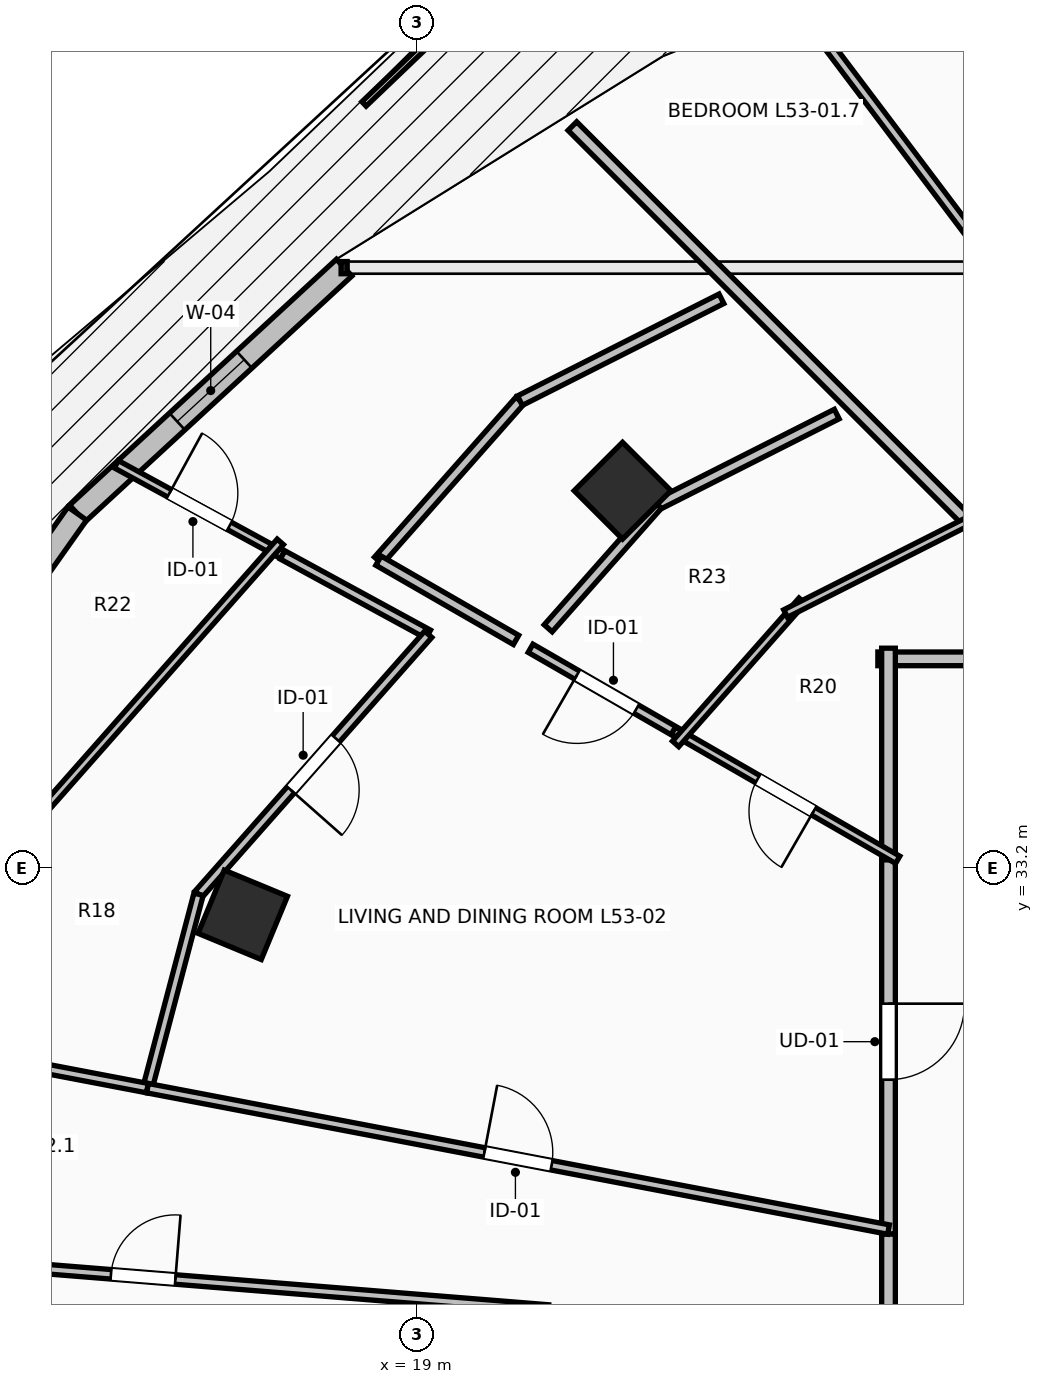
"""IFC4 building model, lengths in metres.
Left out: names, types, materials, properties, quantities, classifications, styles, units other than length and angle.
Written with IfcOpenShell. Run it as: python <this file> out.ifc"""

import sys

from ifc_helpers import new_model, si_unit, direction, frame, frame_2d, origin, origin_2d, place, context, subcontext, project, spatial, rectangle, extrude, element, fill, save


model = new_model("IFC4")
c1 = context("Model", 3, precision=1e-05, world=origin(), true_north=direction((0.0, 1.0)))
c2 = subcontext(c1, "Body", "Model", "MODEL_VIEW")
j1 = project(units=[si_unit("LENGTHUNIT", "METRE"), si_unit("PLANEANGLEUNIT", "RADIAN")], contexts=[c1])
p1 = place(None, origin())
s1 = spatial("IfcSite", under=j1, at=p1, CompositionType="ELEMENT")
p2 = place(p1, origin())
s2 = spatial("IfcBuilding", under=s1, at=p2, CompositionType="ELEMENT")
p3 = place(p2, frame((0.0, 0.0, 196.6)))
s3 = spatial("IfcBuildingStorey", under=s2, at=p3, CompositionType="ELEMENT", Elevation=196.6)
for number, where, z_axis, x_axis in (
    (1, (21.701, 38.162, 0.0), (0.0, 0.0, 1.0), (-0.707, 0.707, 0.0)),
    (2, (16.705, 32.582, 0.0), (0.0, 0.0, 1.0), (-0.924, 0.383, 0.0)),
):
    element("IfcColumn", number, at=place(p3, frame(where, z_axis=z_axis, x_axis=x_axis)), inside=s3, PredefinedType="COLUMN", context=c2, shape_type="SweptSolid", body=[
        extrude(rectangle(XDim=0.9, YDim=0.9, at=origin_2d()), origin(), (0.0, 0.0, 1.0), 3.5),
    ])
p4 = place(p3, frame((18.038, 41.097, 0.0), z_axis=(0.0, 0.0, 1.0), x_axis=(-0.735359993374, -0.677676678177, 0.0)))
e3 = element("IfcWall", 3, at=p4, inside=s3, PredefinedType="STANDARD", context=c2, shape_type="SweptSolid", body=[
    extrude(rectangle(XDim=4.774, YDim=0.3, at=frame_2d((2.387, 0.0))), origin(), (0.0, 0.0, 1.0), 3.24),
])
p5 = place(p4, frame((1.787, 0.0, 0.85)))
e4 = element("IfcOpeningElement", 4, at=p5, cuts=e3, PredefinedType="OPENING", context=c2, shape_type="SweptSolid", body=[
    extrude(rectangle(XDim=1.2, YDim=2.1, at=frame_2d((0.6, 1.05))), frame((0.0, 0.165, 0.0), z_axis=(0.0, -1.0, 0.0), x_axis=(1.0, 0.0, 0.0)), (0.0, 0.0, 1.0), 0.33),
])
p6 = place(p3, frame((14.528, 37.861, 0.0), z_axis=(0.0, 0.0, 1.0), x_axis=(-0.577168747264, -0.81662490605, 0.0)))
e5 = element("IfcWall", 5, at=p6, inside=s3, PredefinedType="STANDARD", context=c2, shape_type="SweptSolid", body=[
    extrude(rectangle(XDim=4.52, YDim=0.3, at=frame_2d((2.26, 0.0))), origin(), (0.0, 0.0, 1.0), 3.24),
])
p7 = place(p6, frame((1.46, 0.0, 0.0)))
e6 = element("IfcOpeningElement", 6, at=p7, cuts=e5, PredefinedType="OPENING", context=c2, shape_type="SweptSolid", body=[
    extrude(rectangle(XDim=1.6, YDim=2.3, at=frame_2d((0.8, 1.15))), frame((0.0, 0.165, 0.0), z_axis=(0.0, -1.0, 0.0), x_axis=(1.0, 0.0, 0.0)), (0.0, 0.0, 1.0), 0.33),
])
p8 = place(p3, frame((25.2, 33.445, 0.0), z_axis=(0.0, 0.0, 1.0), x_axis=(0.0, -1.0, 0.0)))
e7 = element("IfcWall", 7, at=p8, inside=s3, PredefinedType="PARTITIONING", context=c2, shape_type="SweptSolid", body=[
    extrude(rectangle(XDim=5.063, YDim=0.18, at=frame_2d((2.531, 0.0))), origin(), (0.0, 0.0, 1.0), 2.432),
])
p9 = place(p8, frame((2.031, 0.0, 0.0)))
e8 = element("IfcOpeningElement", 8, at=p9, cuts=e7, PredefinedType="OPENING", context=c2, shape_type="SweptSolid", body=[
    extrude(rectangle(XDim=1.0, YDim=2.15, at=frame_2d((0.5, 1.075))), frame((0.0, 0.105, 0.0), z_axis=(0.0, -1.0, 0.0), x_axis=(1.0, 0.0, 0.0)), (0.0, 0.0, 1.0), 0.21),
])
p10 = place(p3, frame((28.105, 35.95, 0.0), z_axis=(0.0, 0.0, 1.0), x_axis=(-1.0, 0.0, 0.0)))
e9 = element("IfcWall", 9, at=p10, inside=s3, PredefinedType="PARTITIONING", context=c2, shape_type="SweptSolid", body=[
    extrude(rectangle(XDim=3.045, YDim=0.18, at=frame_2d((1.522, 0.0))), origin(), (0.0, 0.0, 1.0), 2.432),
])
p11 = place(p3, frame((25.2, 36.09, 0.0), z_axis=(0.0, 0.0, 1.0), x_axis=(0.0, -1.0, 0.0)))
e10 = element("IfcWall", 10, at=p11, inside=s3, PredefinedType="PARTITIONING", context=c2, shape_type="SweptSolid", body=[
    extrude(rectangle(XDim=2.785, YDim=0.18, at=frame_2d((1.393, 0.0))), origin(), (0.0, 0.0, 1.0), 2.432),
])
p12 = place(p3, frame((25.2, 28.382, 0.0), z_axis=(0.0, 0.0, 1.0), x_axis=(0.0, -1.0, 0.0)))
e11 = element("IfcWall", 11, at=p12, inside=s3, PredefinedType="PARTITIONING", context=c2, shape_type="SweptSolid", body=[
    extrude(rectangle(XDim=1.132, YDim=0.18, at=frame_2d((0.566, 0.0))), origin(), (0.0, 0.0, 1.0), 2.432),
])
p13 = place(p3, frame((24.075, 44.46, 0.0), z_axis=(0.0, 0.0, 1.0), x_axis=(0.602185523072, -0.798356183544, 0.0)))
e12 = element("IfcWall", 12, at=p13, inside=s3, PredefinedType="PARTITIONING", context=c2, shape_type="SweptSolid", body=[
    extrude(rectangle(XDim=10.659, YDim=0.125, at=frame_2d((5.33, 0.0))), origin(), (0.0, 0.0, 1.0), 2.432),
])
p14 = place(p3, frame((21.041, 42.959, 0.0), z_axis=(0.0, 0.0, 1.0), x_axis=(0.707106781187, -0.707106781187, 0.0)))
e13 = element("IfcWall", 13, at=p14, inside=s3, PredefinedType="PARTITIONING", context=c2, shape_type="SweptSolid", body=[
    extrude(rectangle(XDim=9.912, YDim=0.16, at=frame_2d((4.956, 0.0))), origin(), (0.0, 0.0, 1.0), 2.432),
])
p15 = place(p3, frame((22.492, 34.936, 0.0), z_axis=(0.0, 0.0, 1.0), x_axis=(-0.866435390844, 0.499289208267, 0.0)))
e14 = element("IfcWall", 14, at=p15, inside=s3, PredefinedType="PARTITIONING", context=c2, shape_type="SweptSolid", body=[
    extrude(rectangle(XDim=2.309, YDim=0.125, at=frame_2d((1.155, 0.0))), origin(), (0.0, 0.0, 1.0), 2.922),
])
p16 = place(p15, frame((0.705, 0.0, 0.0)))
e15 = element("IfcOpeningElement", 15, at=p16, cuts=e14, PredefinedType="OPENING", context=c2, shape_type="SweptSolid", body=[
    extrude(rectangle(XDim=0.9, YDim=2.1, at=frame_2d((0.45, 1.05))), frame((0.0, 0.077, 0.0), z_axis=(0.0, -1.0, 0.0), x_axis=(1.0, 0.0, 0.0)), (0.0, 0.0, 1.0), 0.155),
])
p17 = place(p3, frame((25.321, 33.306, 0.0), z_axis=(0.0, 0.0, 1.0), x_axis=(-0.866517217622, 0.49914718427, 0.0)))
e16 = element("IfcWall", 16, at=p17, inside=s3, PredefinedType="PARTITIONING", context=c2, shape_type="SweptSolid", body=[
    extrude(rectangle(XDim=3.405, YDim=0.11, at=frame_2d((1.703, 0.0))), origin(), (0.0, 0.0, 1.0), 2.922),
])
p18 = place(p17, frame((1.278, 0.0, 0.0)))
e17 = element("IfcOpeningElement", 17, at=p18, cuts=e16, PredefinedType="OPENING", context=c2, shape_type="SweptSolid", body=[
    extrude(rectangle(XDim=0.85, YDim=2.1, at=frame_2d((0.425, 1.05))), frame((0.0, 0.07, 0.0), z_axis=(0.0, -1.0, 0.0), x_axis=(1.0, 0.0, 0.0)), (0.0, 0.0, 1.0), 0.14),
])
p19 = place(p3, frame((15.041, 38.51, 0.0), z_axis=(0.0, 0.0, 1.0), x_axis=(0.877951724479, -0.478749171784, 0.0)))
e18 = element("IfcWall", 18, at=p19, inside=s3, PredefinedType="PARTITIONING", context=c2, shape_type="SweptSolid", body=[
    extrude(rectangle(XDim=2.492, YDim=0.11, at=frame_2d((1.246, 0.0))), origin(), (0.0, 0.0, 1.0), 3.24),
])
p20 = place(p19, frame((0.796, 0.0, 0.0)))
e19 = element("IfcOpeningElement", 19, at=p20, cuts=e18, PredefinedType="OPENING", context=c2, shape_type="SweptSolid", body=[
    extrude(rectangle(XDim=0.9, YDim=2.1, at=frame_2d((0.45, 1.05))), frame((0.0, 0.07, 0.0), z_axis=(0.0, -1.0, 0.0), x_axis=(1.0, 0.0, 0.0)), (0.0, 0.0, 1.0), 0.14),
])
p21 = place(p3, frame((17.229, 37.317, 0.0), z_axis=(0.0, 0.0, 1.0), x_axis=(0.878117834212, -0.47844442649, 0.0)))
e20 = element("IfcWall", 20, at=p21, inside=s3, PredefinedType="PARTITIONING", context=c2, shape_type="SweptSolid", body=[
    extrude(rectangle(XDim=2.182, YDim=0.125, at=frame_2d((1.091, 0.0))), origin(), (0.0, 0.0, 1.0), 3.24),
])
p22 = place(p3, frame((19.145, 36.273, 0.0), z_axis=(0.0, 0.0, 1.0), x_axis=(-0.662162868769, -0.749359950373, 0.0)))
e21 = element("IfcWall", 21, at=p22, inside=s3, PredefinedType="PARTITIONING", context=c2, shape_type="SweptSolid", body=[
    extrude(rectangle(XDim=4.564, YDim=0.125, at=frame_2d((2.282, 0.0))), origin(), (0.0, 0.0, 1.0), 3.24),
])
p23 = place(p22, frame((1.832, 0.0, 0.0)))
e22 = element("IfcOpeningElement", 22, at=p23, cuts=e21, PredefinedType="OPENING", context=c2, shape_type="SweptSolid", body=[
    extrude(rectangle(XDim=0.9, YDim=2.1, at=frame_2d((0.45, 1.05))), frame((0.0, 0.077, 0.0), z_axis=(0.0, -1.0, 0.0), x_axis=(1.0, 0.0, 0.0)), (0.0, 0.0, 1.0), 0.155),
])
p24 = place(p3, frame((16.123, 32.853, 0.0), z_axis=(0.0, 0.0, 1.0), x_axis=(-0.254775717765, -0.967000172512, 0.0)))
e23 = element("IfcWall", 23, at=p24, inside=s3, PredefinedType="PARTITIONING", context=c2, shape_type="SweptSolid", body=[
    extrude(rectangle(XDim=2.638, YDim=0.125, at=frame_2d((1.319, 0.0))), origin(), (0.0, 0.0, 1.0), 3.24),
])
p25 = place(p3, frame((15.451, 30.302, 0.0), z_axis=(0.0, 0.0, 1.0), x_axis=(-0.982295439063, 0.187338384738, 0.0)))
e24 = element("IfcWall", 24, at=p25, inside=s3, PredefinedType="PARTITIONING", context=c2, shape_type="SweptSolid", body=[
    extrude(rectangle(XDim=2.281, YDim=0.125, at=frame_2d((1.14, 0.0))), origin(), (0.0, 0.0, 1.0), 3.24),
])
p26 = place(p3, frame((15.451, 30.302, 0.0), z_axis=(0.0, 0.0, 1.0), x_axis=(0.982284698783, -0.187394691859, 0.0)))
e25 = element("IfcWall", 25, at=p26, inside=s3, PredefinedType="PARTITIONING", context=c2, shape_type="SweptSolid", body=[
    extrude(rectangle(XDim=9.925, YDim=0.125, at=frame_2d((4.962, 0.0))), origin(), (0.0, 0.0, 1.0), 2.774),
])
p27 = place(p26, frame((4.512, 0.0, 0.0)))
e26 = element("IfcOpeningElement", 26, at=p27, cuts=e25, PredefinedType="OPENING", context=c2, shape_type="SweptSolid", body=[
    extrude(rectangle(XDim=0.9, YDim=2.1, at=frame_2d((0.45, 1.05))), frame((0.0, 0.077, 0.0), z_axis=(0.0, -1.0, 0.0), x_axis=(1.0, 0.0, 0.0)), (0.0, 0.0, 1.0), 0.155),
])
p28 = place(p3, frame((22.399, 34.831, 0.0), z_axis=(0.0, 0.0, 1.0), x_axis=(0.662292938072, 0.749244996099, 0.0)))
e27 = element("IfcWall", 27, at=p28, inside=s3, PredefinedType="PARTITIONING", context=c2, shape_type="SweptSolid", body=[
    extrude(rectangle(XDim=2.513, YDim=0.11, at=frame_2d((1.256, 0.0))), origin(), (0.0, 0.0, 1.0), 2.432),
])
p29 = place(p3, frame((23.846, 36.546, 0.0), z_axis=(0.0, 0.0, 1.0), x_axis=(0.892553076465, 0.450942352959, 0.0)))
e28 = element("IfcWall", 28, at=p29, inside=s3, PredefinedType="PARTITIONING", context=c2, shape_type="SweptSolid", body=[
    extrude(rectangle(XDim=2.826, YDim=0.11, at=frame_2d((1.413, 0.0))), origin(), (0.0, 0.0, 1.0), 2.432),
])
p30 = place(p3, frame((13.664, 33.489, 0.0), z_axis=(0.0, 0.0, 1.0), x_axis=(0.662149418065, 0.74937183571, 0.0)))
e29 = element("IfcWall", 29, at=p30, inside=s3, PredefinedType="PARTITIONING", context=c2, shape_type="SweptSolid", body=[
    extrude(rectangle(XDim=5.338, YDim=0.11, at=frame_2d((2.669, 0.0))), origin(), (0.0, 0.0, 1.0), 3.24),
])
p31 = place(p3, frame((10.064, 28.248, 0.0), z_axis=(0.0, 0.0, 1.0), x_axis=(0.996775744362, -0.080237867939, 0.0)))
e30 = element("IfcWall", 30, at=p31, inside=s3, PredefinedType="PARTITIONING", context=c2, shape_type="SweptSolid", body=[
    extrude(rectangle(XDim=10.695, YDim=0.125, at=frame_2d((5.348, 0.0))), origin(), (0.0, 0.0, 1.0), 2.774),
])
p32 = place(p31, frame((4.923, 0.0, 0.0)))
e31 = element("IfcOpeningElement", 31, at=p32, cuts=e30, PredefinedType="OPENING", context=c2, shape_type="SweptSolid", body=[
    extrude(rectangle(XDim=0.85, YDim=2.1, at=frame_2d((0.425, 1.05))), frame((0.0, 0.077, 0.0), z_axis=(0.0, -1.0, 0.0), x_axis=(1.0, 0.0, 0.0)), (0.0, 0.0, 1.0), 0.155),
])
p33 = place(p3, frame((18.49, 37.242, 0.0), z_axis=(0.0, 0.0, 1.0), x_axis=(0.662371376331, 0.749175653513, 0.0)))
e32 = element("IfcWall", 32, at=p33, inside=s3, PredefinedType="PARTITIONING", context=c2, shape_type="SweptSolid", body=[
    extrude(rectangle(XDim=2.81, YDim=0.14, at=frame_2d((1.405, 0.0))), origin(), (0.0, 0.0, 1.0), 3.24),
])
p34 = place(p3, frame((20.351, 39.347, 0.0), z_axis=(0.0, 0.0, 1.0), x_axis=(0.89244587056, 0.451154483653, 0.0)))
e33 = element("IfcWall", 33, at=p34, inside=s3, PredefinedType="PARTITIONING", context=c2, shape_type="SweptSolid", body=[
    extrude(rectangle(XDim=2.97, YDim=0.14, at=frame_2d((1.485, 0.0))), origin(), (0.0, 0.0, 1.0), 3.24),
])
p35 = place(p3, frame((20.3, 36.199, 0.0), z_axis=(0.0, 0.0, 1.0), x_axis=(-0.86645395742, 0.499256987604, 0.0)))
e34 = element("IfcWall", 34, at=p35, inside=s3, PredefinedType="PARTITIONING", context=c2, shape_type="SweptSolid", body=[
    extrude(rectangle(XDim=2.089, YDim=0.14, at=frame_2d((1.044, 0.0))), origin(), (0.0, 0.0, 1.0), 2.774),
])
p36 = place(p3, frame((24.519, 39.17, 0.0), z_axis=(0.0, 0.0, 1.0), x_axis=(-0.89247840077, -0.451090128643, 0.0)))
e35 = element("IfcWall", 35, at=p36, inside=s3, PredefinedType="PARTITIONING", context=c2, shape_type="SweptSolid", body=[
    extrude(rectangle(XDim=2.642, YDim=0.14, at=frame_2d((1.321, 0.0))), origin(), (0.0, 0.0, 1.0), 2.432),
])
p37 = place(p3, frame((22.161, 37.978, 0.0), z_axis=(0.0, 0.0, 1.0), x_axis=(-0.662476802918, -0.749082429106, 0.0)))
e36 = element("IfcWall", 36, at=p37, inside=s3, PredefinedType="PARTITIONING", context=c2, shape_type="SweptSolid", body=[
    extrude(rectangle(XDim=2.171, YDim=0.14, at=frame_2d((1.085, 0.0))), origin(), (0.0, 0.0, 1.0), 2.432),
])
p38 = place(p5, origin())
e37 = element("IfcWindow", 37, at=p38, inside=s3, PartitioningType="SINGLE_PANEL", PredefinedType="WINDOW", context=c2, shape_type="SweptSolid", body=[
    extrude(rectangle(XDim=1.2, YDim=2.1, at=frame_2d((0.6, 1.05))), frame((0.0, 0.03, 0.0), z_axis=(0.0, -1.0, 0.0), x_axis=(1.0, 0.0, 0.0)), (0.0, 0.0, 1.0), 0.06),
])
fill(e4, e37)
p39 = place(p9, origin())
e38 = element("IfcDoor", 38, at=p39, inside=s3, OperationType="SINGLE_SWING_LEFT", PredefinedType="DOOR", context=c2, shape_type="SweptSolid", body=[
    extrude(rectangle(XDim=1.0, YDim=2.15, at=frame_2d((0.5, 1.075))), frame((0.0, 0.025, 0.0), z_axis=(0.0, -1.0, 0.0), x_axis=(1.0, 0.0, 0.0)), (0.0, 0.0, 1.0), 0.05),
])
fill(e8, e38)
p40 = place(p16, origin())
e39 = element("IfcDoor", 39, at=p40, inside=s3, OperationType="SINGLE_SWING_RIGHT", PredefinedType="DOOR", context=c2, shape_type="SweptSolid", body=[
    extrude(rectangle(XDim=0.9, YDim=2.1, at=frame_2d((0.45, 1.05))), frame((0.0, 0.025, 0.0), z_axis=(0.0, -1.0, 0.0), x_axis=(1.0, 0.0, 0.0)), (0.0, 0.0, 1.0), 0.05),
])
fill(e15, e39)
p41 = place(p18, origin())
e40 = element("IfcDoor", 40, at=p41, inside=s3, OperationType="SINGLE_SWING_LEFT", PredefinedType="DOOR", context=c2, shape_type="SweptSolid", body=[
    extrude(rectangle(XDim=0.85, YDim=2.1, at=frame_2d((0.425, 1.05))), frame((0.0, 0.025, 0.0), z_axis=(0.0, -1.0, 0.0), x_axis=(1.0, 0.0, 0.0)), (0.0, 0.0, 1.0), 0.05),
])
fill(e17, e40)
p42 = place(p20, origin())
e41 = element("IfcDoor", 41, at=p42, inside=s3, OperationType="SINGLE_SWING_LEFT", PredefinedType="DOOR", context=c2, shape_type="SweptSolid", body=[
    extrude(rectangle(XDim=0.9, YDim=2.1, at=frame_2d((0.45, 1.05))), frame((0.0, 0.025, 0.0), z_axis=(0.0, -1.0, 0.0), x_axis=(1.0, 0.0, 0.0)), (0.0, 0.0, 1.0), 0.05),
])
fill(e19, e41)
p43 = place(p23, origin())
e42 = element("IfcDoor", 42, at=p43, inside=s3, OperationType="SINGLE_SWING_RIGHT", PredefinedType="DOOR", context=c2, shape_type="SweptSolid", body=[
    extrude(rectangle(XDim=0.9, YDim=2.1, at=frame_2d((0.45, 1.05))), frame((0.0, 0.025, 0.0), z_axis=(0.0, -1.0, 0.0), x_axis=(1.0, 0.0, 0.0)), (0.0, 0.0, 1.0), 0.05),
])
fill(e22, e42)
p44 = place(p27, origin())
e43 = element("IfcDoor", 43, at=p44, inside=s3, OperationType="SINGLE_SWING_LEFT", PredefinedType="DOOR", context=c2, shape_type="SweptSolid", body=[
    extrude(rectangle(XDim=0.9, YDim=2.1, at=frame_2d((0.45, 1.05))), frame((0.0, 0.025, 0.0), z_axis=(0.0, -1.0, 0.0), x_axis=(1.0, 0.0, 0.0)), (0.0, 0.0, 1.0), 0.05),
])
fill(e26, e43)
p45 = place(p32, origin())
e44 = element("IfcDoor", 44, at=p45, inside=s3, OperationType="SINGLE_SWING_RIGHT", PredefinedType="DOOR", context=c2, shape_type="SweptSolid", body=[
    extrude(rectangle(XDim=0.85, YDim=2.1, at=frame_2d((0.425, 1.05))), frame((0.0, 0.025, 0.0), z_axis=(0.0, -1.0, 0.0), x_axis=(1.0, 0.0, 0.0)), (0.0, 0.0, 1.0), 0.05),
])
fill(e31, e44)
save(model, sys.argv[1])
